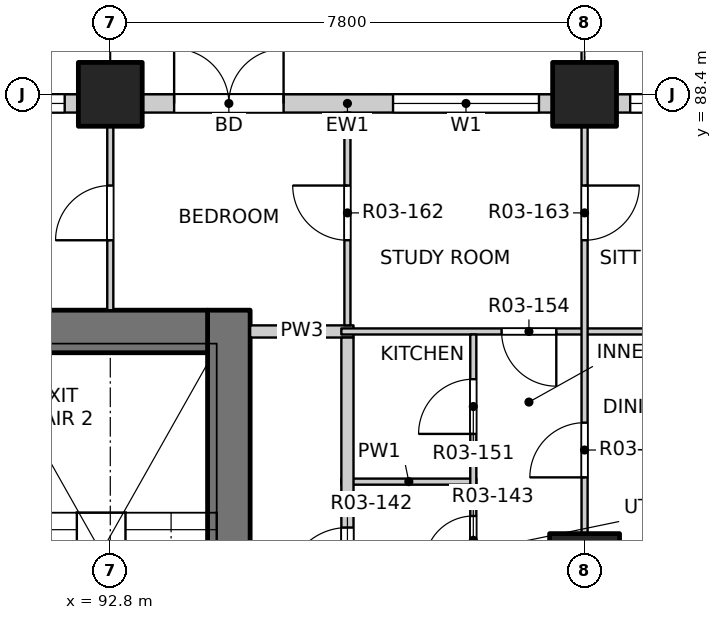
"""IFC4 building model, lengths in metres.
Left out: names, types, materials, properties, quantities, classifications, styles, units other than length and angle.
Written with IfcOpenShell. Run it as: python <this file> out.ifc"""

import sys

from ifc_helpers import new_model, si_unit, direction, frame, frame_2d, origin, origin_2d, place, context, subcontext, project, spatial, rectangle, extrude, element, fill, save


model = new_model("IFC4")
c1 = context("Model", 3, precision=1e-05, world=origin(), true_north=direction((0.0, 1.0)))
c2 = subcontext(c1, "Body", "Model", "MODEL_VIEW")
j1 = project(units=[si_unit("LENGTHUNIT", "METRE"), si_unit("PLANEANGLEUNIT", "RADIAN")], contexts=[c1])
p1 = place(None, origin())
s1 = spatial("IfcSite", under=j1, at=p1, CompositionType="ELEMENT")
p2 = place(p1, origin())
s2 = spatial("IfcBuilding", under=s1, at=p2, CompositionType="ELEMENT")
p3 = place(p2, frame((0.0, 0.0, 43.3)))
s3 = spatial("IfcBuildingStorey", under=s2, at=p3, CompositionType="ELEMENT", Elevation=43.3)
for number, where, z_axis, x_axis in (
    (1, (92.8, 88.4, -0.25), (0.0, 0.0, 1.0), (1.0, 0.0, 0.0)),
    (2, (100.6, 88.4, -0.25), (0.0, 0.0, 1.0), (1.0, 0.0, 0.0)),
):
    element("IfcColumn", number, at=place(p3, frame(where, z_axis=z_axis, x_axis=x_axis)), inside=s3, PredefinedType="COLUMN", context=c2, shape_type="SweptSolid", body=[
        extrude(rectangle(XDim=1.05, YDim=1.05, at=origin_2d()), origin(), (0.0, 0.0, 1.0), 3.35),
    ])
p4 = place(p3, frame((100.6, 80.6, -0.25), z_axis=(0.0, 0.0, 1.0), x_axis=(1.0, 0.0, 0.0)))
e3 = element("IfcColumn", 3, at=p4, inside=s3, PredefinedType="COLUMN", context=c2, shape_type="SweptSolid", body=[
    extrude(rectangle(XDim=1.15, YDim=1.15, at=origin_2d()), origin(), (0.0, 0.0, 1.0), 3.35),
])
p5 = place(p3, frame((94.75, 77.3, -0.25), z_axis=(0.0, 0.0, 1.0), x_axis=(0.0, 1.0, 0.0)))
e4 = element("IfcWall", 4, at=p5, inside=s3, PredefinedType="SOLIDWALL", context=c2, shape_type="SweptSolid", body=[
    extrude(rectangle(XDim=7.55, YDim=0.7, at=frame_2d((3.775, 0.0))), origin(), (0.0, 0.0, 1.0), 3.35),
])
p6 = place(p5, frame((0.3, 0.0, 0.25)))
e5 = element("IfcOpeningElement", 5, at=p6, cuts=e4, PredefinedType="OPENING", context=c2, shape_type="SweptSolid", body=[
    extrude(rectangle(XDim=1.2, YDim=2.1, at=frame_2d((0.6, 1.05))), frame((0.0, 0.36, 0.0), z_axis=(0.0, -1.0, 0.0), x_axis=(1.0, 0.0, 0.0)), (0.0, 0.0, 1.0), 0.72),
])
p7 = place(p3, frame((75.6, 84.5, -0.25), z_axis=(0.0, 0.0, 1.0), x_axis=(1.0, 0.0, 0.0)))
e6 = element("IfcWall", 6, at=p7, inside=s3, PredefinedType="SOLIDWALL", context=c2, shape_type="SweptSolid", body=[
    extrude(rectangle(XDim=18.8, YDim=0.7, at=frame_2d((9.4, 0.0))), origin(), (0.0, 0.0, 1.0), 3.35),
])
p8 = place(p3, frame((85.525, 88.25, 0.0), z_axis=(0.0, 0.0, 1.0), x_axis=(1.0, 0.0, 0.0)))
e7 = element("IfcWall", 7, at=p8, inside=s3, PredefinedType="SOLIDWALL", context=c2, shape_type="SweptSolid", body=[
    extrude(rectangle(XDim=6.75, YDim=0.3, at=frame_2d((3.375, 0.0))), origin(), (0.0, 0.0, 1.0), 3.1),
])
p9 = place(p8, frame((0.525, 0.0, 0.0)))
e8 = element("IfcOpeningElement", 8, at=p9, cuts=e7, PredefinedType="OPENING", context=c2, shape_type="SweptSolid", body=[
    extrude(rectangle(XDim=1.8, YDim=2.4, at=frame_2d((0.9, 1.2))), frame((0.0, 0.16, 0.0), z_axis=(0.0, -1.0, 0.0), x_axis=(1.0, 0.0, 0.0)), (0.0, 0.0, 1.0), 0.32),
])
p10 = place(p8, frame((4.125, 0.0, 0.9)))
e9 = element("IfcOpeningElement", 9, at=p10, cuts=e7, PredefinedType="OPENING", context=c2, shape_type="SweptSolid", body=[
    extrude(rectangle(XDim=2.4, YDim=1.8, at=frame_2d((1.2, 0.9))), frame((0.0, 0.16, 0.0), z_axis=(0.0, -1.0, 0.0), x_axis=(1.0, 0.0, 0.0)), (0.0, 0.0, 1.0), 0.32),
])
p11 = place(p3, frame((93.325, 88.25, 0.0), z_axis=(0.0, 0.0, 1.0), x_axis=(1.0, 0.0, 0.0)))
e10 = element("IfcWall", 10, at=p11, inside=s3, PredefinedType="SOLIDWALL", context=c2, shape_type="SweptSolid", body=[
    extrude(rectangle(XDim=6.75, YDim=0.3, at=frame_2d((3.375, 0.0))), origin(), (0.0, 0.0, 1.0), 3.1),
])
p12 = place(p11, frame((0.525, 0.0, 0.0)))
e11 = element("IfcOpeningElement", 11, at=p12, cuts=e10, PredefinedType="OPENING", context=c2, shape_type="SweptSolid", body=[
    extrude(rectangle(XDim=1.8, YDim=2.4, at=frame_2d((0.9, 1.2))), frame((0.0, 0.16, 0.0), z_axis=(0.0, -1.0, 0.0), x_axis=(1.0, 0.0, 0.0)), (0.0, 0.0, 1.0), 0.32),
])
p13 = place(p11, frame((4.125, 0.0, 0.9)))
e12 = element("IfcOpeningElement", 12, at=p13, cuts=e10, PredefinedType="OPENING", context=c2, shape_type="SweptSolid", body=[
    extrude(rectangle(XDim=2.4, YDim=1.8, at=frame_2d((1.2, 0.9))), frame((0.0, 0.16, 0.0), z_axis=(0.0, -1.0, 0.0), x_axis=(1.0, 0.0, 0.0)), (0.0, 0.0, 1.0), 0.32),
])
p14 = place(p3, frame((101.125, 88.25, 0.0), z_axis=(0.0, 0.0, 1.0), x_axis=(1.0, 0.0, 0.0)))
e13 = element("IfcWall", 13, at=p14, inside=s3, PredefinedType="SOLIDWALL", context=c2, shape_type="SweptSolid", body=[
    extrude(rectangle(XDim=3.375, YDim=0.3, at=frame_2d((1.688, 0.0))), origin(), (0.0, 0.0, 1.0), 3.1),
])
p15 = place(p14, frame((0.225, 0.0, 0.9)))
e14 = element("IfcOpeningElement", 14, at=p15, cuts=e13, PredefinedType="OPENING", context=c2, shape_type="SweptSolid", body=[
    extrude(rectangle(XDim=2.4, YDim=1.8, at=frame_2d((1.2, 0.9))), frame((0.0, 0.16, 0.0), z_axis=(0.0, -1.0, 0.0), x_axis=(1.0, 0.0, 0.0)), (0.0, 0.0, 1.0), 0.32),
])
p16 = place(p3, frame((96.6, 82.03, 0.0), z_axis=(0.0, 0.0, 1.0), x_axis=(1.0, 0.0, 0.0)))
e15 = element("IfcWall", 15, at=p16, inside=s3, PredefinedType="PARTITIONING", context=c2, shape_type="SweptSolid", body=[
    extrude(rectangle(XDim=2.22, YDim=0.1, at=frame_2d((1.11, 0.0))), origin(), (0.0, 0.0, 1.0), 3.1),
])
p17 = place(p3, frame((95.1, 84.5, 0.0), z_axis=(0.0, 0.0, 1.0), x_axis=(1.0, 0.0, 0.0)))
e16 = element("IfcWall", 16, at=p17, inside=s3, PredefinedType="PARTITIONING", context=c2, shape_type="SweptSolid", body=[
    extrude(rectangle(XDim=1.7, YDim=0.2, at=frame_2d((0.85, 0.0))), origin(), (0.0, 0.0, 1.0), 3.1),
])
p18 = place(p3, frame((96.6, 84.5, 0.0), z_axis=(0.0, 0.0, 1.0), x_axis=(1.0, 0.0, 0.0)))
e17 = element("IfcWall", 17, at=p18, inside=s3, PredefinedType="PARTITIONING", context=c2, shape_type="SweptSolid", body=[
    extrude(rectangle(XDim=11.5, YDim=0.1, at=frame_2d((5.75, 0.0))), origin(), (0.0, 0.0, 1.0), 3.1),
])
p19 = place(p18, frame((2.635, 0.0, 0.0)))
e18 = element("IfcOpeningElement", 18, at=p19, cuts=e17, PredefinedType="OPENING", context=c2, shape_type="SweptSolid", body=[
    extrude(rectangle(XDim=0.9, YDim=2.1, at=frame_2d((0.45, 1.05))), frame((0.0, 0.06, 0.0), z_axis=(0.0, -1.0, 0.0), x_axis=(1.0, 0.0, 0.0)), (0.0, 0.0, 1.0), 0.12),
])
p20 = place(p3, frame((92.8, 84.85, 0.0), z_axis=(0.0, 0.0, 1.0), x_axis=(0.0, 1.0, 0.0)))
e19 = element("IfcWall", 19, at=p20, inside=s3, PredefinedType="PARTITIONING", context=c2, shape_type="SweptSolid", body=[
    extrude(rectangle(XDim=3.25, YDim=0.1, at=frame_2d((1.625, 0.0))), origin(), (0.0, 0.0, 1.0), 3.1),
])
p21 = place(p20, frame((1.15, 0.0, 0.0)))
e20 = element("IfcOpeningElement", 20, at=p21, cuts=e19, PredefinedType="OPENING", context=c2, shape_type="SweptSolid", body=[
    extrude(rectangle(XDim=0.9, YDim=2.1, at=frame_2d((0.45, 1.05))), frame((0.0, 0.06, 0.0), z_axis=(0.0, -1.0, 0.0), x_axis=(1.0, 0.0, 0.0)), (0.0, 0.0, 1.0), 0.12),
])
p22 = place(p3, frame((96.7, 53.4, 0.0), z_axis=(0.0, 0.0, 1.0), x_axis=(0.0, 1.0, 0.0)))
e21 = element("IfcWall", 21, at=p22, inside=s3, PredefinedType="PARTITIONING", context=c2, shape_type="SweptSolid", body=[
    extrude(rectangle(XDim=31.0, YDim=0.2, at=frame_2d((15.5, 0.0))), origin(), (0.0, 0.0, 1.0), 3.1),
])
p23 = place(p22, frame((3.325, 0.0, 0.0)))
e22 = element("IfcOpeningElement", 22, at=p23, cuts=e21, PredefinedType="OPENING", context=c2, shape_type="SweptSolid", body=[
    extrude(rectangle(XDim=1.0, YDim=2.1, at=frame_2d((0.5, 1.05))), frame((0.0, 0.11, 0.0), z_axis=(0.0, -1.0, 0.0), x_axis=(1.0, 0.0, 0.0)), (0.0, 0.0, 1.0), 0.22),
])
p24 = place(p22, frame((11.125, 0.0, 0.0)))
e23 = element("IfcOpeningElement", 23, at=p24, cuts=e21, PredefinedType="OPENING", context=c2, shape_type="SweptSolid", body=[
    extrude(rectangle(XDim=1.0, YDim=2.1, at=frame_2d((0.5, 1.05))), frame((0.0, 0.11, 0.0), z_axis=(0.0, -1.0, 0.0), x_axis=(1.0, 0.0, 0.0)), (0.0, 0.0, 1.0), 0.22),
])
p25 = place(p22, frame((26.875, 0.0, 0.0)))
e24 = element("IfcOpeningElement", 24, at=p25, cuts=e21, PredefinedType="OPENING", context=c2, shape_type="SweptSolid", body=[
    extrude(rectangle(XDim=1.0, YDim=2.1, at=frame_2d((0.5, 1.05))), frame((0.0, 0.11, 0.0), z_axis=(0.0, -1.0, 0.0), x_axis=(1.0, 0.0, 0.0)), (0.0, 0.0, 1.0), 0.22),
])
p26 = place(p3, frame((96.7, 84.6, 0.0), z_axis=(0.0, 0.0, 1.0), x_axis=(0.0, 1.0, 0.0)))
e25 = element("IfcWall", 25, at=p26, inside=s3, PredefinedType="PARTITIONING", context=c2, shape_type="SweptSolid", body=[
    extrude(rectangle(XDim=3.5, YDim=0.1, at=frame_2d((1.75, 0.0))), origin(), (0.0, 0.0, 1.0), 3.1),
])
p27 = place(p26, frame((1.4, 0.0, 0.0)))
e26 = element("IfcOpeningElement", 26, at=p27, cuts=e25, PredefinedType="OPENING", context=c2, shape_type="SweptSolid", body=[
    extrude(rectangle(XDim=0.9, YDim=2.1, at=frame_2d((0.45, 1.05))), frame((0.0, 0.06, 0.0), z_axis=(0.0, -1.0, 0.0), x_axis=(1.0, 0.0, 0.0)), (0.0, 0.0, 1.0), 0.12),
])
p28 = place(p3, frame((98.77, 80.15, 0.0), z_axis=(0.0, 0.0, 1.0), x_axis=(0.0, 1.0, 0.0)))
e27 = element("IfcWall", 27, at=p28, inside=s3, PredefinedType="PARTITIONING", context=c2, shape_type="SweptSolid", body=[
    extrude(rectangle(XDim=4.3, YDim=0.1, at=frame_2d((2.15, 0.0))), origin(), (0.0, 0.0, 1.0), 3.1),
])
p29 = place(p28, frame((0.515, 0.0, 0.0)))
e28 = element("IfcOpeningElement", 28, at=p29, cuts=e27, PredefinedType="OPENING", context=c2, shape_type="SweptSolid", body=[
    extrude(rectangle(XDim=0.8, YDim=2.1, at=frame_2d((0.4, 1.05))), frame((0.0, 0.06, 0.0), z_axis=(0.0, -1.0, 0.0), x_axis=(1.0, 0.0, 0.0)), (0.0, 0.0, 1.0), 0.12),
])
p30 = place(p28, frame((2.665, 0.0, 0.0)))
e29 = element("IfcOpeningElement", 29, at=p30, cuts=e27, PredefinedType="OPENING", context=c2, shape_type="SweptSolid", body=[
    extrude(rectangle(XDim=0.9, YDim=2.1, at=frame_2d((0.45, 1.05))), frame((0.0, 0.06, 0.0), z_axis=(0.0, -1.0, 0.0), x_axis=(1.0, 0.0, 0.0)), (0.0, 0.0, 1.0), 0.12),
])
p31 = place(p3, frame((100.6, 41.9, 0.0), z_axis=(0.0, 0.0, 1.0), x_axis=(0.0, 1.0, 0.0)))
e30 = element("IfcWall", 30, at=p31, inside=s3, PredefinedType="PARTITIONING", context=c2, shape_type="SweptSolid", body=[
    extrude(rectangle(XDim=46.2, YDim=0.1, at=frame_2d((23.1, 0.0))), origin(), (0.0, 0.0, 1.0), 3.1),
])
p32 = place(p31, frame((1.2, 0.0, 0.0)))
e31 = element("IfcOpeningElement", 31, at=p32, cuts=e30, PredefinedType="OPENING", context=c2, shape_type="SweptSolid", body=[
    extrude(rectangle(XDim=0.9, YDim=2.1, at=frame_2d((0.45, 1.05))), frame((0.0, 0.06, 0.0), z_axis=(0.0, -1.0, 0.0), x_axis=(1.0, 0.0, 0.0)), (0.0, 0.0, 1.0), 0.12),
])
p33 = place(p31, frame((5.9, 0.0, 0.0)))
e32 = element("IfcOpeningElement", 32, at=p33, cuts=e30, PredefinedType="OPENING", context=c2, shape_type="SweptSolid", body=[
    extrude(rectangle(XDim=0.9, YDim=2.1, at=frame_2d((0.45, 1.05))), frame((0.0, 0.06, 0.0), z_axis=(0.0, -1.0, 0.0), x_axis=(1.0, 0.0, 0.0)), (0.0, 0.0, 1.0), 0.12),
])
p34 = place(p31, frame((9.0, 0.0, 0.0)))
e33 = element("IfcOpeningElement", 33, at=p34, cuts=e30, PredefinedType="OPENING", context=c2, shape_type="SweptSolid", body=[
    extrude(rectangle(XDim=0.9, YDim=2.1, at=frame_2d((0.45, 1.05))), frame((0.0, 0.06, 0.0), z_axis=(0.0, -1.0, 0.0), x_axis=(1.0, 0.0, 0.0)), (0.0, 0.0, 1.0), 0.12),
])
p35 = place(p31, frame((13.725, 0.0, 0.0)))
e34 = element("IfcOpeningElement", 34, at=p35, cuts=e30, PredefinedType="OPENING", context=c2, shape_type="SweptSolid", body=[
    extrude(rectangle(XDim=0.9, YDim=2.1, at=frame_2d((0.45, 1.05))), frame((0.0, 0.06, 0.0), z_axis=(0.0, -1.0, 0.0), x_axis=(1.0, 0.0, 0.0)), (0.0, 0.0, 1.0), 0.12),
])
p36 = place(p31, frame((17.775, 0.0, 0.0)))
e35 = element("IfcOpeningElement", 35, at=p36, cuts=e30, PredefinedType="OPENING", context=c2, shape_type="SweptSolid", body=[
    extrude(rectangle(XDim=0.9, YDim=2.1, at=frame_2d((0.45, 1.05))), frame((0.0, 0.06, 0.0), z_axis=(0.0, -1.0, 0.0), x_axis=(1.0, 0.0, 0.0)), (0.0, 0.0, 1.0), 0.12),
])
p37 = place(p31, frame((21.5, 0.0, 0.0)))
e36 = element("IfcOpeningElement", 36, at=p37, cuts=e30, PredefinedType="OPENING", context=c2, shape_type="SweptSolid", body=[
    extrude(rectangle(XDim=0.9, YDim=2.1, at=frame_2d((0.45, 1.05))), frame((0.0, 0.06, 0.0), z_axis=(0.0, -1.0, 0.0), x_axis=(1.0, 0.0, 0.0)), (0.0, 0.0, 1.0), 0.12),
])
p38 = place(p31, frame((24.6, 0.0, 0.0)))
e37 = element("IfcOpeningElement", 37, at=p38, cuts=e30, PredefinedType="OPENING", context=c2, shape_type="SweptSolid", body=[
    extrude(rectangle(XDim=0.9, YDim=2.1, at=frame_2d((0.45, 1.05))), frame((0.0, 0.06, 0.0), z_axis=(0.0, -1.0, 0.0), x_axis=(1.0, 0.0, 0.0)), (0.0, 0.0, 1.0), 0.12),
])
p39 = place(p31, frame((28.5, 0.0, 0.0)))
e38 = element("IfcOpeningElement", 38, at=p39, cuts=e30, PredefinedType="OPENING", context=c2, shape_type="SweptSolid", body=[
    extrude(rectangle(XDim=0.9, YDim=2.1, at=frame_2d((0.45, 1.05))), frame((0.0, 0.06, 0.0), z_axis=(0.0, -1.0, 0.0), x_axis=(1.0, 0.0, 0.0)), (0.0, 0.0, 1.0), 0.12),
])
p40 = place(p31, frame((33.375, 0.0, 0.0)))
e39 = element("IfcOpeningElement", 39, at=p40, cuts=e30, PredefinedType="OPENING", context=c2, shape_type="SweptSolid", body=[
    extrude(rectangle(XDim=0.9, YDim=2.1, at=frame_2d((0.45, 1.05))), frame((0.0, 0.06, 0.0), z_axis=(0.0, -1.0, 0.0), x_axis=(1.0, 0.0, 0.0)), (0.0, 0.0, 1.0), 0.12),
])
p41 = place(p31, frame((37.1, 0.0, 0.0)))
e40 = element("IfcOpeningElement", 40, at=p41, cuts=e30, PredefinedType="OPENING", context=c2, shape_type="SweptSolid", body=[
    extrude(rectangle(XDim=0.9, YDim=2.1, at=frame_2d((0.45, 1.05))), frame((0.0, 0.06, 0.0), z_axis=(0.0, -1.0, 0.0), x_axis=(1.0, 0.0, 0.0)), (0.0, 0.0, 1.0), 0.12),
])
p42 = place(p31, frame((40.2, 0.0, 0.0)))
e41 = element("IfcOpeningElement", 41, at=p42, cuts=e30, PredefinedType="OPENING", context=c2, shape_type="SweptSolid", body=[
    extrude(rectangle(XDim=0.9, YDim=2.1, at=frame_2d((0.45, 1.05))), frame((0.0, 0.06, 0.0), z_axis=(0.0, -1.0, 0.0), x_axis=(1.0, 0.0, 0.0)), (0.0, 0.0, 1.0), 0.12),
])
p43 = place(p31, frame((44.1, 0.0, 0.0)))
e42 = element("IfcOpeningElement", 42, at=p43, cuts=e30, PredefinedType="OPENING", context=c2, shape_type="SweptSolid", body=[
    extrude(rectangle(XDim=0.9, YDim=2.1, at=frame_2d((0.45, 1.05))), frame((0.0, 0.06, 0.0), z_axis=(0.0, -1.0, 0.0), x_axis=(1.0, 0.0, 0.0)), (0.0, 0.0, 1.0), 0.12),
])
p44 = place(p10, origin())
e43 = element("IfcWindow", 43, at=p44, inside=s3, PartitioningType="DOUBLE_PANEL_VERTICAL", PredefinedType="WINDOW", context=c2, shape_type="SweptSolid", body=[
    extrude(rectangle(XDim=2.4, YDim=1.8, at=frame_2d((1.2, 0.9))), frame((0.0, 0.03, 0.0), z_axis=(0.0, -1.0, 0.0), x_axis=(1.0, 0.0, 0.0)), (0.0, 0.0, 1.0), 0.06),
])
fill(e9, e43)
p45 = place(p12, origin())
e44 = element("IfcDoor", 44, at=p45, inside=s3, OperationType="DOUBLE_DOOR_SINGLE_SWING", PredefinedType="DOOR", context=c2, shape_type="SweptSolid", body=[
    extrude(rectangle(XDim=1.8, YDim=2.4, at=frame_2d((0.9, 1.2))), frame((0.0, 0.025, 0.0), z_axis=(0.0, -1.0, 0.0), x_axis=(1.0, 0.0, 0.0)), (0.0, 0.0, 1.0), 0.05),
])
fill(e11, e44)
p46 = place(p13, origin())
e45 = element("IfcWindow", 45, at=p46, inside=s3, PartitioningType="DOUBLE_PANEL_VERTICAL", PredefinedType="WINDOW", context=c2, shape_type="SweptSolid", body=[
    extrude(rectangle(XDim=2.4, YDim=1.8, at=frame_2d((1.2, 0.9))), frame((0.0, 0.03, 0.0), z_axis=(0.0, -1.0, 0.0), x_axis=(1.0, 0.0, 0.0)), (0.0, 0.0, 1.0), 0.06),
])
fill(e12, e45)
p47 = place(p15, origin())
e46 = element("IfcWindow", 46, at=p47, inside=s3, PartitioningType="DOUBLE_PANEL_VERTICAL", PredefinedType="WINDOW", context=c2, shape_type="SweptSolid", body=[
    extrude(rectangle(XDim=2.4, YDim=1.8, at=frame_2d((1.2, 0.9))), frame((0.0, 0.03, 0.0), z_axis=(0.0, -1.0, 0.0), x_axis=(1.0, 0.0, 0.0)), (0.0, 0.0, 1.0), 0.06),
])
fill(e14, e46)
p48 = place(p25, origin())
e47 = element("IfcDoor", 47, at=p48, inside=s3, OperationType="SINGLE_SWING_LEFT", PredefinedType="DOOR", context=c2, shape_type="SweptSolid", body=[
    extrude(rectangle(XDim=1.0, YDim=2.1, at=frame_2d((0.5, 1.05))), frame((0.0, 0.025, 0.0), z_axis=(0.0, -1.0, 0.0), x_axis=(1.0, 0.0, 0.0)), (0.0, 0.0, 1.0), 0.05),
])
fill(e24, e47)
p49 = place(p29, origin())
e48 = element("IfcDoor", 48, at=p49, inside=s3, OperationType="SINGLE_SWING_LEFT", PredefinedType="DOOR", context=c2, shape_type="SweptSolid", body=[
    extrude(rectangle(XDim=0.8, YDim=2.1, at=frame_2d((0.4, 1.05))), frame((0.0, 0.025, 0.0), z_axis=(0.0, -1.0, 0.0), x_axis=(1.0, 0.0, 0.0)), (0.0, 0.0, 1.0), 0.05),
])
fill(e28, e48)
p50 = place(p42, origin())
e49 = element("IfcDoor", 49, at=p50, inside=s3, OperationType="SINGLE_SWING_LEFT", PredefinedType="DOOR", context=c2, shape_type="SweptSolid", body=[
    extrude(rectangle(XDim=0.9, YDim=2.1, at=frame_2d((0.45, 1.05))), frame((0.0, 0.025, 0.0), z_axis=(0.0, -1.0, 0.0), x_axis=(1.0, 0.0, 0.0)), (0.0, 0.0, 1.0), 0.05),
])
fill(e41, e49)
p51 = place(p30, origin())
e50 = element("IfcDoor", 50, at=p51, inside=s3, OperationType="SINGLE_SWING_LEFT", PredefinedType="DOOR", context=c2, shape_type="SweptSolid", body=[
    extrude(rectangle(XDim=0.9, YDim=2.1, at=frame_2d((0.45, 1.05))), frame((0.0, 0.025, 0.0), z_axis=(0.0, -1.0, 0.0), x_axis=(1.0, 0.0, 0.0)), (0.0, 0.0, 1.0), 0.05),
])
fill(e29, e50)
p52 = place(p19, origin())
e51 = element("IfcDoor", 51, at=p52, inside=s3, OperationType="SINGLE_SWING_LEFT", PredefinedType="DOOR", context=c2, shape_type="SweptSolid", body=[
    extrude(rectangle(XDim=0.9, YDim=2.1, at=frame_2d((0.45, 1.05))), frame((0.0, 0.025, 0.0), z_axis=(0.0, -1.0, 0.0), x_axis=(1.0, 0.0, 0.0)), (0.0, 0.0, 1.0), 0.05),
])
fill(e18, e51)
p53 = place(p21, origin())
e52 = element("IfcDoor", 52, at=p53, inside=s3, OperationType="SINGLE_SWING_LEFT", PredefinedType="DOOR", context=c2, shape_type="SweptSolid", body=[
    extrude(rectangle(XDim=0.9, YDim=2.1, at=frame_2d((0.45, 1.05))), frame((0.0, 0.025, 0.0), z_axis=(0.0, -1.0, 0.0), x_axis=(1.0, 0.0, 0.0)), (0.0, 0.0, 1.0), 0.05),
])
fill(e20, e52)
p54 = place(p27, origin())
e53 = element("IfcDoor", 53, at=p54, inside=s3, OperationType="SINGLE_SWING_RIGHT", PredefinedType="DOOR", context=c2, shape_type="SweptSolid", body=[
    extrude(rectangle(XDim=0.9, YDim=2.1, at=frame_2d((0.45, 1.05))), frame((0.0, 0.025, 0.0), z_axis=(0.0, -1.0, 0.0), x_axis=(1.0, 0.0, 0.0)), (0.0, 0.0, 1.0), 0.05),
])
fill(e26, e53)
p55 = place(p43, origin())
e54 = element("IfcDoor", 54, at=p55, inside=s3, OperationType="SINGLE_SWING_LEFT", PredefinedType="DOOR", context=c2, shape_type="SweptSolid", body=[
    extrude(rectangle(XDim=0.9, YDim=2.1, at=frame_2d((0.45, 1.05))), frame((0.0, 0.025, 0.0), z_axis=(0.0, -1.0, 0.0), x_axis=(1.0, 0.0, 0.0)), (0.0, 0.0, 1.0), 0.05),
])
fill(e42, e54)
save(model, sys.argv[1])
